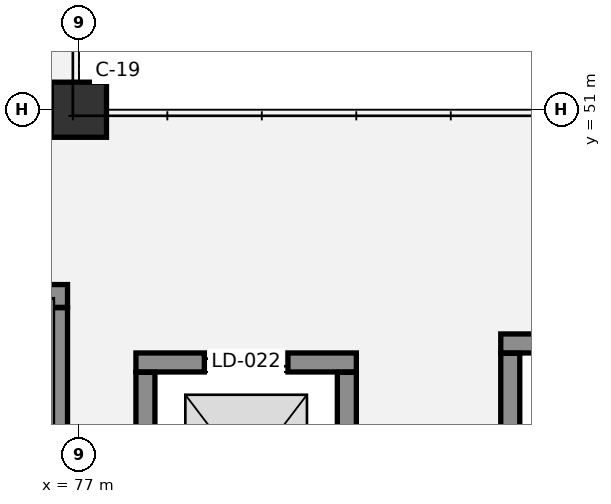
"""IFC4 building model, lengths in metres.
Left out: names, types, materials, properties, quantities, classifications, styles, units other than length and angle.
Written with IfcOpenShell. Run it as: python <this file> out.ifc"""

import sys

from ifc_helpers import new_model, si_unit, direction, frame, frame_2d, origin, origin_2d, place, context, subcontext, project, spatial, rectangle, extrude, element, fill, save


model = new_model("IFC4")
c1 = context("Model", 3, precision=1e-05, world=origin(), true_north=direction((0.0, 1.0)))
c2 = subcontext(c1, "Body", "Model", "MODEL_VIEW")
j1 = project(units=[si_unit("LENGTHUNIT", "METRE"), si_unit("PLANEANGLEUNIT", "RADIAN")], contexts=[c1])
p1 = place(None, origin())
s1 = spatial("IfcSite", under=j1, at=p1, CompositionType="ELEMENT")
p2 = place(p1, origin())
s2 = spatial("IfcBuilding", under=s1, at=p2, CompositionType="ELEMENT")
p3 = place(p2, frame((0.0, 0.0, 18.3)))
s3 = spatial("IfcBuildingStorey", under=s2, at=p3, CompositionType="ELEMENT", Elevation=18.3)
p4 = place(p3, frame((77.0, 51.0, 0.0), z_axis=(0.0, 0.0, 1.0), x_axis=(1.0, 0.0, 0.0)))
e1 = element("IfcColumn", 1, at=p4, inside=s3, PredefinedType="COLUMN", context=c2, shape_type="SweptSolid", body=[
    extrude(rectangle(XDim=0.725, YDim=0.725, at=origin_2d()), origin(), (0.0, 0.0, 1.0), 3.75),
])
p5 = place(p3, frame((80.65, 47.675, 0.0), z_axis=(0.0, 0.0, 1.0), x_axis=(-1.0, 0.0, 0.0)))
e2 = element("IfcWall", 2, at=p5, inside=s3, PredefinedType="SHEAR", context=c2, shape_type="SweptSolid", body=[
    extrude(rectangle(XDim=2.9, YDim=0.25, at=frame_2d((1.45, 0.0))), origin(), (0.0, 0.0, 1.0), 3.75),
])
p6 = place(p5, frame((0.9, 0.0, 0.0)))
e3 = element("IfcOpeningElement", 3, at=p6, cuts=e2, PredefinedType="OPENING", context=c2, shape_type="SweptSolid", body=[
    extrude(rectangle(XDim=1.1, YDim=2.15, at=frame_2d((0.55, 1.075))), frame((0.0, 0.135, 0.0), z_axis=(0.0, -1.0, 0.0), x_axis=(1.0, 0.0, 0.0)), (0.0, 0.0, 1.0), 0.27),
])
for number, where, z_axis, x_axis in (
    (4, (77.875, 47.545, 0.0), (0.0, 0.0, 1.0), (0.0, -1.0, 0.0)),
    (5, (80.525, 44.855, 0.0), (0.0, 0.0, 1.0), (0.0, 1.0, 0.0)),
):
    element("IfcWall", number, at=place(p3, frame(where, z_axis=z_axis, x_axis=x_axis)), inside=s3, PredefinedType="SHEAR", context=c2, shape_type="SweptSolid", body=[
        extrude(rectangle(XDim=2.69, YDim=0.25, at=frame_2d((1.345, 0.0))), origin(), (0.0, 0.0, 1.0), 3.75),
    ])
p7 = place(p3, frame((85.45, 47.925, 0.0), z_axis=(0.0, 0.0, 1.0), x_axis=(-1.0, 0.0, 0.0)))
e6 = element("IfcWall", 6, at=p7, inside=s3, PredefinedType="SHEAR", context=c2, shape_type="SweptSolid", body=[
    extrude(rectangle(XDim=2.9, YDim=0.25, at=frame_2d((1.45, 0.0))), origin(), (0.0, 0.0, 1.0), 3.75),
])
p8 = place(p3, frame((82.675, 47.795, 0.0), z_axis=(0.0, 0.0, 1.0), x_axis=(0.0, -1.0, 0.0)))
e7 = element("IfcWall", 7, at=p8, inside=s3, PredefinedType="SHEAR", context=c2, shape_type="SweptSolid", body=[
    extrude(rectangle(XDim=2.79, YDim=0.25, at=frame_2d((1.395, 0.0))), origin(), (0.0, 0.0, 1.0), 3.75),
])
p9 = place(p3, frame((76.85, 48.55, 0.0), z_axis=(0.0, 0.0, 1.0), x_axis=(-1.0, 0.0, 0.0)))
e8 = element("IfcWall", 8, at=p9, inside=s3, PredefinedType="SHEAR", context=c2, shape_type="SweptSolid", body=[
    extrude(rectangle(XDim=7.7, YDim=0.3, at=frame_2d((3.85, 0.0))), origin(), (0.0, 0.0, 1.0), 3.47),
])
p10 = place(p9, frame((6.025, 0.0, 0.0)))
e9 = element("IfcOpeningElement", 9, at=p10, cuts=e8, PredefinedType="OPENING", context=c2, shape_type="SweptSolid", body=[
    extrude(rectangle(XDim=1.25, YDim=2.15, at=frame_2d((0.625, 1.075))), frame((0.0, 0.16, 0.0), z_axis=(0.0, -1.0, 0.0), x_axis=(1.0, 0.0, 0.0)), (0.0, 0.0, 1.0), 0.32),
])
p11 = place(p3, frame((76.7, 44.195, 0.0), z_axis=(0.0, 0.0, 1.0), x_axis=(0.0, 1.0, 0.0)))
e10 = element("IfcWall", 10, at=p11, inside=s3, PredefinedType="SHEAR", context=c2, shape_type="SweptSolid", body=[
    extrude(rectangle(XDim=4.2, YDim=0.3, at=frame_2d((2.1, 0.0))), origin(), (0.0, 0.0, 1.0), 3.47),
])
p12 = place(p6, origin())
e11 = element("IfcDoor", 11, at=p12, inside=s3, OperationType="DOUBLE_DOOR_SLIDING", PredefinedType="DOOR", context=c2, shape_type="SweptSolid", body=[
    extrude(rectangle(XDim=1.1, YDim=2.15, at=frame_2d((0.55, 1.075))), frame((0.0, 0.025, 0.0), z_axis=(0.0, -1.0, 0.0), x_axis=(1.0, 0.0, 0.0)), (0.0, 0.0, 1.0), 0.05),
])
fill(e3, e11)
save(model, sys.argv[1])
